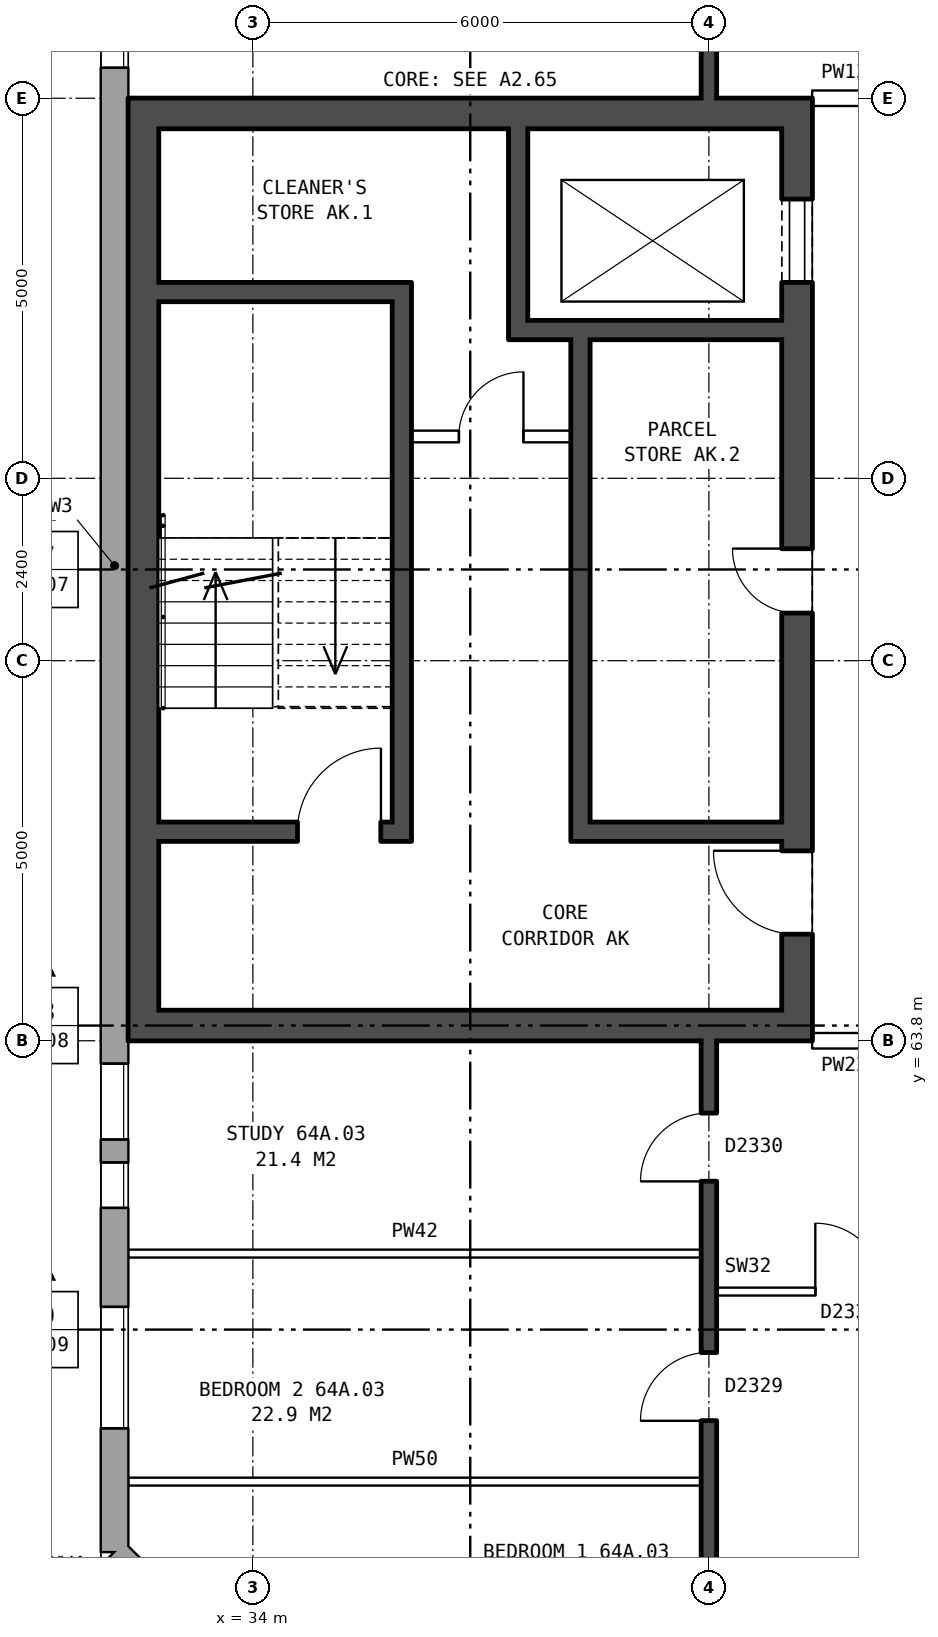
"""IFC4 building model, lengths in metres.
Left out: names, types, materials, properties, quantities, classifications, styles, units other than length and angle.
Written with IfcOpenShell. Run it as: python <this file> out.ifc"""

import sys

from ifc_helpers import new_model, si_unit, direction, frame, frame_2d, origin, place, context, subcontext, project, spatial, rectangle, extrude, element, fill, save


model = new_model("IFC4")
c1 = context("Model", 3, precision=1e-05, world=origin(), true_north=direction((0.0, 1.0)))
c2 = subcontext(c1, "Body", "Model", "MODEL_VIEW")
j1 = project(units=[si_unit("LENGTHUNIT", "METRE"), si_unit("PLANEANGLEUNIT", "RADIAN")], contexts=[c1])
p1 = place(None, origin())
s1 = spatial("IfcSite", under=j1, at=p1, CompositionType="ELEMENT")
p2 = place(p1, origin())
s2 = spatial("IfcBuilding", under=s1, at=p2, CompositionType="ELEMENT")
p3 = place(p2, frame((0.0, 0.0, 227.6)))
s3 = spatial("IfcBuildingStorey", under=s2, at=p3, CompositionType="ELEMENT", Elevation=227.6)
p4 = place(p3, frame((32.18, 57.075, 0.0), z_axis=(0.0, 0.0, 1.0), x_axis=(0.707106781187, -0.707106781187, 0.0)))
e1 = element("IfcWall", 1, at=p4, inside=s3, PredefinedType="STANDARD", context=c2, shape_type="SweptSolid", body=[
    extrude(rectangle(XDim=4.094, YDim=0.36, at=frame_2d((2.047, 0.0))), origin(), (0.0, 0.0, 1.0), 2.85),
])
p5 = place(p4, frame((1.247, 0.0, 0.8)))
e2 = element("IfcOpeningElement", 2, at=p5, cuts=e1, PredefinedType="OPENING", context=c2, shape_type="SweptSolid", body=[
    extrude(rectangle(XDim=1.6, YDim=1.8, at=frame_2d((0.8, 0.9))), frame((0.0, 0.19, 0.0), z_axis=(0.0, -1.0, 0.0), x_axis=(1.0, 0.0, 0.0)), (0.0, 0.0, 1.0), 0.38),
])
p6 = place(p3, frame((32.18, 82.925, 0.0), z_axis=(0.0, 0.0, 1.0), x_axis=(0.0, -1.0, 0.0)))
e3 = element("IfcWall", 3, at=p6, inside=s3, PredefinedType="STANDARD", context=c2, shape_type="SweptSolid", body=[
    extrude(rectangle(XDim=25.851, YDim=0.36, at=frame_2d((12.925, 0.0))), origin(), (0.0, 0.0, 1.0), 2.85),
])
p7 = place(p6, frame((1.625, 0.0, 0.8)))
e4 = element("IfcOpeningElement", 4, at=p7, cuts=e3, PredefinedType="OPENING", context=c2, shape_type="SweptSolid", body=[
    extrude(rectangle(XDim=1.6, YDim=1.8, at=frame_2d((0.8, 0.9))), frame((0.0, 0.19, 0.0), z_axis=(0.0, -1.0, 0.0), x_axis=(1.0, 0.0, 0.0)), (0.0, 0.0, 1.0), 0.38),
])
p8 = place(p6, frame((4.425, 0.0, 1.7)))
e5 = element("IfcOpeningElement", 5, at=p8, cuts=e3, PredefinedType="OPENING", context=c2, shape_type="SweptSolid", body=[
    extrude(rectangle(XDim=0.6, YDim=0.9, at=frame_2d((0.3, 0.45))), frame((0.0, 0.19, 0.0), z_axis=(0.0, -1.0, 0.0), x_axis=(1.0, 0.0, 0.0)), (0.0, 0.0, 1.0), 0.38),
])
p9 = place(p6, frame((19.425, 0.0, 0.8)))
e6 = element("IfcOpeningElement", 6, at=p9, cuts=e3, PredefinedType="OPENING", context=c2, shape_type="SweptSolid", body=[
    extrude(rectangle(XDim=1.0, YDim=1.8, at=frame_2d((0.5, 0.9))), frame((0.0, 0.19, 0.0), z_axis=(0.0, -1.0, 0.0), x_axis=(1.0, 0.0, 0.0)), (0.0, 0.0, 1.0), 0.38),
])
p10 = place(p6, frame((22.625, 0.0, 0.8)))
e7 = element("IfcOpeningElement", 7, at=p10, cuts=e3, PredefinedType="OPENING", context=c2, shape_type="SweptSolid", body=[
    extrude(rectangle(XDim=1.6, YDim=1.8, at=frame_2d((0.8, 0.9))), frame((0.0, 0.19, 0.0), z_axis=(0.0, -1.0, 0.0), x_axis=(1.0, 0.0, 0.0)), (0.0, 0.0, 1.0), 0.38),
])
p11 = place(p6, frame((5.325, 0.0, 0.8)))
e8 = element("IfcOpeningElement", 8, at=p11, cuts=e3, PredefinedType="OPENING", context=c2, shape_type="SweptSolid", body=[
    extrude(rectangle(XDim=1.0, YDim=1.8, at=frame_2d((0.5, 0.9))), frame((0.0, 0.19, 0.0), z_axis=(0.0, -1.0, 0.0), x_axis=(1.0, 0.0, 0.0)), (0.0, 0.0, 1.0), 0.38),
])
p12 = place(p6, frame((20.725, 0.0, 1.6)))
e9 = element("IfcOpeningElement", 9, at=p12, cuts=e3, PredefinedType="OPENING", context=c2, shape_type="SweptSolid", body=[
    extrude(rectangle(XDim=0.6, YDim=0.9, at=frame_2d((0.3, 0.45))), frame((0.0, 0.19, 0.0), z_axis=(0.0, -1.0, 0.0), x_axis=(1.0, 0.0, 0.0)), (0.0, 0.0, 1.0), 0.38),
])
p13 = place(p3, frame((41.16, 76.2, 0.0), z_axis=(0.0, 0.0, 1.0), x_axis=(0.0, -1.0, 0.0)))
e10 = element("IfcWall", 10, at=p13, inside=s3, PredefinedType="SHEAR", context=c2, shape_type="SweptSolid", body=[
    extrude(rectangle(XDim=12.4, YDim=0.4, at=frame_2d((6.2, 0.0))), origin(), (0.0, 0.0, 1.0), 2.85),
])
p14 = place(p13, frame((1.325, 0.0, 0.0)))
e11 = element("IfcOpeningElement", 11, at=p14, cuts=e10, PredefinedType="OPENING", context=c2, shape_type="SweptSolid", body=[
    extrude(rectangle(XDim=1.1, YDim=2.1, at=frame_2d((0.55, 1.05))), frame((0.0, 0.21, 0.0), z_axis=(0.0, -1.0, 0.0), x_axis=(1.0, 0.0, 0.0)), (0.0, 0.0, 1.0), 0.42),
])
p15 = place(p13, frame((5.925, 0.0, 0.0)))
e12 = element("IfcOpeningElement", 12, at=p15, cuts=e10, PredefinedType="OPENING", context=c2, shape_type="SweptSolid", body=[
    extrude(rectangle(XDim=0.85, YDim=2.1, at=frame_2d((0.425, 1.05))), frame((0.0, 0.21, 0.0), z_axis=(0.0, -1.0, 0.0), x_axis=(1.0, 0.0, 0.0)), (0.0, 0.0, 1.0), 0.42),
])
p16 = place(p13, frame((9.9, 0.0, 0.0)))
e13 = element("IfcOpeningElement", 13, at=p16, cuts=e10, PredefinedType="OPENING", context=c2, shape_type="SweptSolid", body=[
    extrude(rectangle(XDim=1.1, YDim=2.1, at=frame_2d((0.55, 1.05))), frame((0.0, 0.21, 0.0), z_axis=(0.0, -1.0, 0.0), x_axis=(1.0, 0.0, 0.0)), (0.0, 0.0, 1.0), 0.42),
])
p17 = place(p3, frame((32.56, 76.2, 0.0), z_axis=(0.0, 0.0, 1.0), x_axis=(0.0, -1.0, 0.0)))
e14 = element("IfcWall", 14, at=p17, inside=s3, PredefinedType="SHEAR", context=c2, shape_type="SweptSolid", body=[
    extrude(rectangle(XDim=12.4, YDim=0.4, at=frame_2d((6.2, 0.0))), origin(), (0.0, 0.0, 1.0), 2.85),
])
for number, where, z_axis, x_axis in (
    (15, (40.96, 76.0, 0.0), (0.0, 0.0, 1.0), (-1.0, 0.0, 0.0)),
    (16, (40.96, 64.0, 0.0), (0.0, 0.0, 1.0), (-1.0, 0.0, 0.0)),
):
    element("IfcWall", number, at=place(p3, frame(where, z_axis=z_axis, x_axis=x_axis)), inside=s3, PredefinedType="SHEAR", context=c2, shape_type="SweptSolid", body=[
        extrude(rectangle(XDim=8.2, YDim=0.4, at=frame_2d((4.1, 0.0))), origin(), (0.0, 0.0, 1.0), 2.85),
    ])
p18 = place(p3, frame((35.835, 73.65, 0.0), z_axis=(0.0, 0.0, 1.0), x_axis=(-1.0, 0.0, 0.0)))
e17 = element("IfcWall", 17, at=p18, inside=s3, PredefinedType="SHEAR", context=c2, shape_type="SweptSolid", body=[
    extrude(rectangle(XDim=3.075, YDim=0.25, at=frame_2d((1.538, 0.0))), origin(), (0.0, 0.0, 1.0), 2.85),
])
p19 = place(p3, frame((40.96, 73.15, 0.0), z_axis=(0.0, 0.0, 1.0), x_axis=(-1.0, 0.0, 0.0)))
e18 = element("IfcWall", 18, at=p19, inside=s3, PredefinedType="SHEAR", context=c2, shape_type="SweptSolid", body=[
    extrude(rectangle(XDim=3.595, YDim=0.25, at=frame_2d((1.797, 0.0))), origin(), (0.0, 0.0, 1.0), 2.85),
])
p20 = place(p3, frame((38.185, 71.75, 0.0), z_axis=(0.0, 0.0, 1.0), x_axis=(-1.0, 0.0, 0.0)))
e19 = element("IfcWall", 19, at=p20, inside=s3, PredefinedType="PARTITIONING", context=c2, shape_type="SweptSolid", body=[
    extrude(rectangle(XDim=2.1, YDim=0.15, at=frame_2d((1.05, 0.0))), origin(), (0.0, 0.0, 1.0), 2.85),
])
p21 = place(p20, frame((0.625, 0.0, 0.0)))
e20 = element("IfcOpeningElement", 20, at=p21, cuts=e19, PredefinedType="OPENING", context=c2, shape_type="SweptSolid", body=[
    extrude(rectangle(XDim=0.85, YDim=2.1, at=frame_2d((0.425, 1.05))), frame((0.0, 0.085, 0.0), z_axis=(0.0, -1.0, 0.0), x_axis=(1.0, 0.0, 0.0)), (0.0, 0.0, 1.0), 0.17),
])
p22 = place(p3, frame((40.96, 66.55, 0.0), z_axis=(0.0, 0.0, 1.0), x_axis=(-1.0, 0.0, 0.0)))
e21 = element("IfcWall", 21, at=p22, inside=s3, PredefinedType="SHEAR", context=c2, shape_type="SweptSolid", body=[
    extrude(rectangle(XDim=2.525, YDim=0.25, at=frame_2d((1.262, 0.0))), origin(), (0.0, 0.0, 1.0), 2.85),
])
p23 = place(p3, frame((35.835, 66.55, 0.0), z_axis=(0.0, 0.0, 1.0), x_axis=(-1.0, 0.0, 0.0)))
e22 = element("IfcWall", 22, at=p23, inside=s3, PredefinedType="SHEAR", context=c2, shape_type="SweptSolid", body=[
    extrude(rectangle(XDim=3.075, YDim=0.25, at=frame_2d((1.538, 0.0))), origin(), (0.0, 0.0, 1.0), 2.85),
])
p24 = place(p23, frame((0.15, 0.0, 0.0)))
e23 = element("IfcOpeningElement", 23, at=p24, cuts=e22, PredefinedType="OPENING", context=c2, shape_type="SweptSolid", body=[
    extrude(rectangle(XDim=1.1, YDim=2.1, at=frame_2d((0.55, 1.05))), frame((0.0, 0.135, 0.0), z_axis=(0.0, -1.0, 0.0), x_axis=(1.0, 0.0, 0.0)), (0.0, 0.0, 1.0), 0.27),
])
p25 = place(p3, frame((38.31, 73.025, 0.0), z_axis=(0.0, 0.0, 1.0), x_axis=(0.0, -1.0, 0.0)))
e24 = element("IfcWall", 24, at=p25, inside=s3, PredefinedType="SHEAR", context=c2, shape_type="SweptSolid", body=[
    extrude(rectangle(XDim=6.6, YDim=0.25, at=frame_2d((3.3, 0.0))), origin(), (0.0, 0.0, 1.0), 2.85),
])
p26 = place(p3, frame((37.49, 75.8, 0.0), z_axis=(0.0, 0.0, 1.0), x_axis=(0.0, -1.0, 0.0)))
e25 = element("IfcWall", 25, at=p26, inside=s3, PredefinedType="SHEAR", context=c2, shape_type="SweptSolid", body=[
    extrude(rectangle(XDim=2.525, YDim=0.25, at=frame_2d((1.263, 0.0))), origin(), (0.0, 0.0, 1.0), 2.85),
])
p27 = place(p3, frame((35.96, 73.775, 0.0), z_axis=(0.0, 0.0, 1.0), x_axis=(0.0, -1.0, 0.0)))
e26 = element("IfcWall", 26, at=p27, inside=s3, PredefinedType="SHEAR", context=c2, shape_type="SweptSolid", body=[
    extrude(rectangle(XDim=7.35, YDim=0.25, at=frame_2d((3.675, 0.0))), origin(), (0.0, 0.0, 1.0), 2.85),
])
p28 = place(p3, frame((32.36, 58.0, 0.0), z_axis=(0.0, 0.0, 1.0), x_axis=(1.0, 0.0, 0.0)))
e27 = element("IfcWall", 27, at=p28, inside=s3, PredefinedType="PARTITIONING", context=c2, shape_type="SweptSolid", body=[
    extrude(rectangle(XDim=7.54, YDim=0.1, at=frame_2d((3.77, 0.0))), origin(), (0.0, 0.0, 1.0), 2.85),
])
p29 = place(p3, frame((40.1, 60.5, 0.0), z_axis=(0.0, 0.0, 1.0), x_axis=(1.0, 0.0, 0.0)))
e28 = element("IfcWall", 28, at=p29, inside=s3, PredefinedType="PARTITIONING", context=c2, shape_type="SweptSolid", body=[
    extrude(rectangle(XDim=5.8, YDim=0.1, at=frame_2d((2.9, 0.0))), origin(), (0.0, 0.0, 1.0), 2.85),
])
p30 = place(p29, frame((1.3, 0.0, 0.0)))
e29 = element("IfcOpeningElement", 29, at=p30, cuts=e28, PredefinedType="OPENING", context=c2, shape_type="SweptSolid", body=[
    extrude(rectangle(XDim=0.9, YDim=2.1, at=frame_2d((0.45, 1.05))), frame((0.0, 0.06, 0.0), z_axis=(0.0, -1.0, 0.0), x_axis=(1.0, 0.0, 0.0)), (0.0, 0.0, 1.0), 0.12),
])
p31 = place(p29, frame((4.2, 0.0, 0.0)))
e30 = element("IfcOpeningElement", 30, at=p31, cuts=e28, PredefinedType="OPENING", context=c2, shape_type="SweptSolid", body=[
    extrude(rectangle(XDim=0.9, YDim=2.1, at=frame_2d((0.45, 1.05))), frame((0.0, 0.06, 0.0), z_axis=(0.0, -1.0, 0.0), x_axis=(1.0, 0.0, 0.0)), (0.0, 0.0, 1.0), 0.12),
])
p32 = place(p3, frame((32.36, 61.0, 0.0), z_axis=(0.0, 0.0, 1.0), x_axis=(1.0, 0.0, 0.0)))
e31 = element("IfcWall", 31, at=p32, inside=s3, PredefinedType="PARTITIONING", context=c2, shape_type="SweptSolid", body=[
    extrude(rectangle(XDim=7.54, YDim=0.1, at=frame_2d((3.77, 0.0))), origin(), (0.0, 0.0, 1.0), 2.85),
])
p33 = place(p3, frame((41.36, 63.8, 0.0), z_axis=(0.0, 0.0, 1.0), x_axis=(1.0, 0.0, 0.0)))
e32 = element("IfcWall", 32, at=p33, inside=s3, PredefinedType="PARTITIONING", context=c2, shape_type="SweptSolid", body=[
    extrude(rectangle(XDim=3.0, YDim=0.2, at=frame_2d((1.5, 0.0))), origin(), (0.0, 0.0, 1.0), 2.85),
])
p34 = place(p33, frame((1.0, 0.0, 0.0)))
e33 = element("IfcOpeningElement", 33, at=p34, cuts=e32, PredefinedType="OPENING", context=c2, shape_type="SweptSolid", body=[
    extrude(rectangle(XDim=1.0, YDim=2.1, at=frame_2d((0.5, 1.05))), frame((0.0, 0.11, 0.0), z_axis=(0.0, -1.0, 0.0), x_axis=(1.0, 0.0, 0.0)), (0.0, 0.0, 1.0), 0.22),
])
p35 = place(p3, frame((41.36, 76.2, 0.0), z_axis=(0.0, 0.0, 1.0), x_axis=(1.0, 0.0, 0.0)))
e34 = element("IfcWall", 34, at=p35, inside=s3, PredefinedType="PARTITIONING", context=c2, shape_type="SweptSolid", body=[
    extrude(rectangle(XDim=3.0, YDim=0.2, at=frame_2d((1.5, 0.0))), origin(), (0.0, 0.0, 1.0), 2.85),
])
p36 = place(p35, frame((1.0, 0.0, 0.0)))
e35 = element("IfcOpeningElement", 35, at=p36, cuts=e34, PredefinedType="OPENING", context=c2, shape_type="SweptSolid", body=[
    extrude(rectangle(XDim=1.0, YDim=2.1, at=frame_2d((0.5, 1.05))), frame((0.0, 0.11, 0.0), z_axis=(0.0, -1.0, 0.0), x_axis=(1.0, 0.0, 0.0)), (0.0, 0.0, 1.0), 0.22),
])
p37 = place(p3, frame((40.0, 54.36, 0.0), z_axis=(0.0, 0.0, 1.0), x_axis=(0.0, 1.0, 0.0)))
e36 = element("IfcWall", 36, at=p37, inside=s3, PredefinedType="SOLIDWALL", context=c2, shape_type="SweptSolid", body=[
    extrude(rectangle(XDim=9.44, YDim=0.2, at=frame_2d((4.72, 0.0))), origin(), (0.0, 0.0, 1.0), 2.85),
])
p38 = place(p37, frame((1.37, 0.0, 0.0)))
e37 = element("IfcOpeningElement", 37, at=p38, cuts=e36, PredefinedType="OPENING", context=c2, shape_type="SweptSolid", body=[
    extrude(rectangle(XDim=0.9, YDim=2.1, at=frame_2d((0.45, 1.05))), frame((0.0, 0.11, 0.0), z_axis=(0.0, -1.0, 0.0), x_axis=(1.0, 0.0, 0.0)), (0.0, 0.0, 1.0), 0.22),
])
p39 = place(p37, frame((4.44, 0.0, 0.0)))
e38 = element("IfcOpeningElement", 38, at=p39, cuts=e36, PredefinedType="OPENING", context=c2, shape_type="SweptSolid", body=[
    extrude(rectangle(XDim=0.9, YDim=2.1, at=frame_2d((0.45, 1.05))), frame((0.0, 0.11, 0.0), z_axis=(0.0, -1.0, 0.0), x_axis=(1.0, 0.0, 0.0)), (0.0, 0.0, 1.0), 0.22),
])
p40 = place(p37, frame((7.59, 0.0, 0.0)))
e39 = element("IfcOpeningElement", 39, at=p40, cuts=e36, PredefinedType="OPENING", context=c2, shape_type="SweptSolid", body=[
    extrude(rectangle(XDim=0.9, YDim=2.1, at=frame_2d((0.45, 1.05))), frame((0.0, 0.11, 0.0), z_axis=(0.0, -1.0, 0.0), x_axis=(1.0, 0.0, 0.0)), (0.0, 0.0, 1.0), 0.22),
])
p41 = place(p3, frame((40.0, 76.2, 0.0), z_axis=(0.0, 0.0, 1.0), x_axis=(0.0, 1.0, 0.0)))
e40 = element("IfcWall", 40, at=p41, inside=s3, PredefinedType="SOLIDWALL", context=c2, shape_type="SweptSolid", body=[
    extrude(rectangle(XDim=9.44, YDim=0.2, at=frame_2d((4.72, 0.0))), origin(), (0.0, 0.0, 1.0), 2.85),
])
p42 = place(p41, frame((7.17, 0.0, 0.0)))
e41 = element("IfcOpeningElement", 41, at=p42, cuts=e40, PredefinedType="OPENING", context=c2, shape_type="SweptSolid", body=[
    extrude(rectangle(XDim=0.9, YDim=2.1, at=frame_2d((0.45, 1.05))), frame((0.0, 0.11, 0.0), z_axis=(0.0, -1.0, 0.0), x_axis=(1.0, 0.0, 0.0)), (0.0, 0.0, 1.0), 0.22),
])
p43 = place(p41, frame((4.25, 0.0, 0.0)))
e42 = element("IfcOpeningElement", 42, at=p43, cuts=e40, PredefinedType="OPENING", context=c2, shape_type="SweptSolid", body=[
    extrude(rectangle(XDim=0.9, YDim=2.1, at=frame_2d((0.45, 1.05))), frame((0.0, 0.11, 0.0), z_axis=(0.0, -1.0, 0.0), x_axis=(1.0, 0.0, 0.0)), (0.0, 0.0, 1.0), 0.22),
])
p44 = place(p41, frame((0.95, 0.0, 0.0)))
e43 = element("IfcOpeningElement", 43, at=p44, cuts=e40, PredefinedType="OPENING", context=c2, shape_type="SweptSolid", body=[
    extrude(rectangle(XDim=0.9, YDim=2.1, at=frame_2d((0.45, 1.05))), frame((0.0, 0.11, 0.0), z_axis=(0.0, -1.0, 0.0), x_axis=(1.0, 0.0, 0.0)), (0.0, 0.0, 1.0), 0.22),
])
p45 = place(p9, origin())
e44 = element("IfcWindow", 44, at=p45, inside=s3, PartitioningType="SINGLE_PANEL", PredefinedType="WINDOW", context=c2, shape_type="SweptSolid", body=[
    extrude(rectangle(XDim=1.0, YDim=1.8, at=frame_2d((0.5, 0.9))), frame((0.0, 0.15, 0.0), z_axis=(0.0, -1.0, 0.0), x_axis=(1.0, 0.0, 0.0)), (0.0, 0.0, 1.0), 0.06),
])
fill(e6, e44)
p46 = place(p10, origin())
e45 = element("IfcWindow", 45, at=p46, inside=s3, PartitioningType="SINGLE_PANEL", PredefinedType="WINDOW", context=c2, shape_type="SweptSolid", body=[
    extrude(rectangle(XDim=1.6, YDim=1.8, at=frame_2d((0.8, 0.9))), frame((0.0, 0.15, 0.0), z_axis=(0.0, -1.0, 0.0), x_axis=(1.0, 0.0, 0.0)), (0.0, 0.0, 1.0), 0.06),
])
fill(e7, e45)
p47 = place(p14, origin())
e46 = element("IfcDoor", 46, at=p47, inside=s3, OperationType="DOUBLE_DOOR_SLIDING", PredefinedType="DOOR", context=c2, shape_type="SweptSolid", body=[
    extrude(rectangle(XDim=1.1, YDim=2.1, at=frame_2d((0.55, 1.05))), frame((0.0, -0.135, 0.0), z_axis=(0.0, -1.0, 0.0), x_axis=(1.0, 0.0, 0.0)), (0.0, 0.0, 1.0), 0.05),
])
fill(e11, e46)
p48 = place(p15, frame((0.85, 0.0, 0.0), z_axis=(0.0, 0.0, 1.0), x_axis=(-1.0, 0.0, 0.0)))
e47 = element("IfcDoor", 47, at=p48, inside=s3, OperationType="SINGLE_SWING_RIGHT", PredefinedType="DOOR", context=c2, shape_type="SweptSolid", body=[
    extrude(rectangle(XDim=0.85, YDim=2.1, at=frame_2d((0.425, 1.05))), frame((0.0, 0.185, 0.0), z_axis=(0.0, -1.0, 0.0), x_axis=(1.0, 0.0, 0.0)), (0.0, 0.0, 1.0), 0.05),
])
fill(e12, e47)
p49 = place(p16, frame((1.1, 0.0, 0.0), z_axis=(0.0, 0.0, 1.0), x_axis=(-1.0, 0.0, 0.0)))
e48 = element("IfcDoor", 48, at=p49, inside=s3, OperationType="SINGLE_SWING_RIGHT", PredefinedType="DOOR", context=c2, shape_type="SweptSolid", body=[
    extrude(rectangle(XDim=1.1, YDim=2.1, at=frame_2d((0.55, 1.05))), frame((0.0, 0.185, 0.0), z_axis=(0.0, -1.0, 0.0), x_axis=(1.0, 0.0, 0.0)), (0.0, 0.0, 1.0), 0.05),
])
fill(e13, e48)
p50 = place(p24, frame((1.1, 0.0, 0.0), z_axis=(0.0, 0.0, 1.0), x_axis=(-1.0, 0.0, 0.0)))
e49 = element("IfcDoor", 49, at=p50, inside=s3, OperationType="SINGLE_SWING_RIGHT", PredefinedType="DOOR", context=c2, shape_type="SweptSolid", body=[
    extrude(rectangle(XDim=1.1, YDim=2.1, at=frame_2d((0.55, 1.05))), frame((0.0, 0.025, 0.0), z_axis=(0.0, -1.0, 0.0), x_axis=(1.0, 0.0, 0.0)), (0.0, 0.0, 1.0), 0.05),
])
fill(e23, e49)
p51 = place(p21, frame((0.85, 0.0, 0.0), z_axis=(0.0, 0.0, 1.0), x_axis=(-1.0, 0.0, 0.0)))
e50 = element("IfcDoor", 50, at=p51, inside=s3, OperationType="SINGLE_SWING_RIGHT", PredefinedType="DOOR", context=c2, shape_type="SweptSolid", body=[
    extrude(rectangle(XDim=0.85, YDim=2.1, at=frame_2d((0.425, 1.05))), frame((0.0, 0.025, 0.0), z_axis=(0.0, -1.0, 0.0), x_axis=(1.0, 0.0, 0.0)), (0.0, 0.0, 1.0), 0.05),
])
fill(e20, e50)
p52 = place(p39, origin())
e51 = element("IfcDoor", 51, at=p52, inside=s3, OperationType="SINGLE_SWING_LEFT", PredefinedType="DOOR", context=c2, shape_type="SweptSolid", body=[
    extrude(rectangle(XDim=0.9, YDim=2.1, at=frame_2d((0.45, 1.05))), frame((0.0, 0.025, 0.0), z_axis=(0.0, -1.0, 0.0), x_axis=(1.0, 0.0, 0.0)), (0.0, 0.0, 1.0), 0.05),
])
fill(e38, e51)
p53 = place(p40, origin())
e52 = element("IfcDoor", 52, at=p53, inside=s3, OperationType="SINGLE_SWING_LEFT", PredefinedType="DOOR", context=c2, shape_type="SweptSolid", body=[
    extrude(rectangle(XDim=0.9, YDim=2.1, at=frame_2d((0.45, 1.05))), frame((0.0, 0.025, 0.0), z_axis=(0.0, -1.0, 0.0), x_axis=(1.0, 0.0, 0.0)), (0.0, 0.0, 1.0), 0.05),
])
fill(e39, e52)
p54 = place(p30, origin())
e53 = element("IfcDoor", 53, at=p54, inside=s3, OperationType="SINGLE_SWING_LEFT", PredefinedType="DOOR", context=c2, shape_type="SweptSolid", body=[
    extrude(rectangle(XDim=0.9, YDim=2.1, at=frame_2d((0.45, 1.05))), frame((0.0, 0.025, 0.0), z_axis=(0.0, -1.0, 0.0), x_axis=(1.0, 0.0, 0.0)), (0.0, 0.0, 1.0), 0.05),
])
fill(e29, e53)
p55 = place(p11, origin())
e54 = element("IfcWindow", 54, at=p55, inside=s3, PartitioningType="SINGLE_PANEL", PredefinedType="WINDOW", context=c2, shape_type="SweptSolid", body=[
    extrude(rectangle(XDim=1.0, YDim=1.8, at=frame_2d((0.5, 0.9))), frame((0.0, 0.15, 0.0), z_axis=(0.0, -1.0, 0.0), x_axis=(1.0, 0.0, 0.0)), (0.0, 0.0, 1.0), 0.06),
])
fill(e8, e54)
p56 = place(p12, origin())
e55 = element("IfcWindow", 55, at=p56, inside=s3, PartitioningType="SINGLE_PANEL", PredefinedType="WINDOW", context=c2, shape_type="SweptSolid", body=[
    extrude(rectangle(XDim=0.6, YDim=0.9, at=frame_2d((0.3, 0.45))), frame((0.0, 0.15, 0.0), z_axis=(0.0, -1.0, 0.0), x_axis=(1.0, 0.0, 0.0)), (0.0, 0.0, 1.0), 0.06),
])
fill(e9, e55)
save(model, sys.argv[1])
